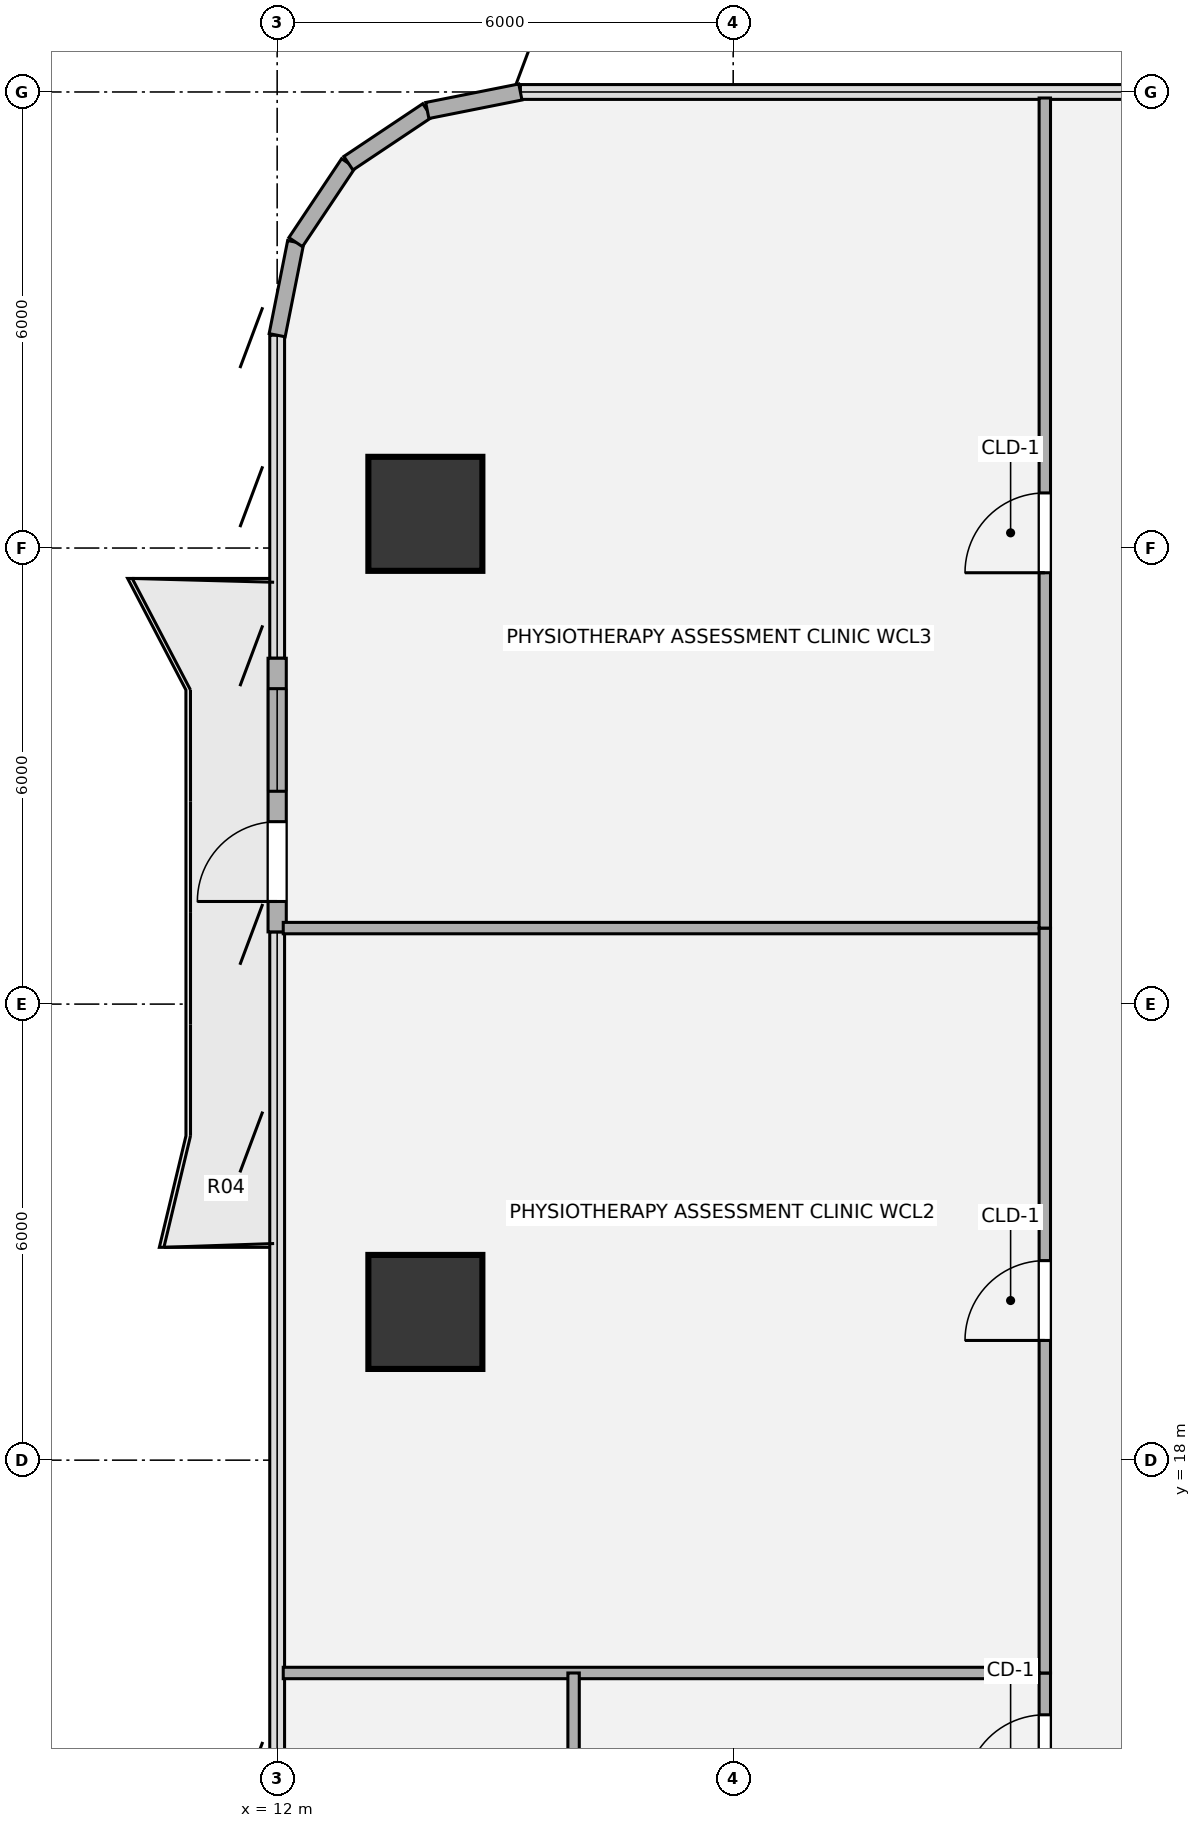
"""IFC4 building model, lengths in metres.
Left out: names, types, materials, properties, quantities, classifications, styles, units other than length and angle.
Written with IfcOpenShell. Run it as: python <this file> out.ifc"""

import sys

from ifc_helpers import new_model, si_unit, direction, frame, frame_2d, origin, origin_2d, place, context, subcontext, project, spatial, rectangle, hollow_circle, extrude, source, transform, mapped, element, fill, save


model = new_model("IFC4")
c1 = context("Model", 3, precision=1e-05, world=origin(), true_north=direction((0.0, 1.0)))
c2 = subcontext(c1, "Body", "Model", "MODEL_VIEW")
j1 = project(units=[si_unit("LENGTHUNIT", "METRE"), si_unit("PLANEANGLEUNIT", "RADIAN")], contexts=[c1])
p1 = place(None, origin())
s1 = spatial("IfcSite", under=j1, at=p1, CompositionType="ELEMENT")
p2 = place(p1, origin())
s2 = spatial("IfcBuilding", under=s1, at=p2, CompositionType="ELEMENT")
p3 = place(p2, frame((0.0, 0.0, 49.68)))
s3 = spatial("IfcBuildingStorey", under=s2, at=p3, CompositionType="ELEMENT", Elevation=49.68)
m1 = source(origin(), c2, "Body", "SweptSolid", [
    extrude(hollow_circle(Radius=0.75, WallThickness=0.05, at=origin_2d()), origin(), (0.0, 0.0, 1.0), 3.78),
])
for number, where, z_axis, x_axis in (
    (1, (13.95, 19.95, 0.0), (0.0, 0.0, 1.0), (1.0, 0.0, 0.0)),
    (2, (13.95, 30.45, 0.0), (0.0, 0.0, 1.0), (1.0, 0.0, 0.0)),
):
    element("IfcColumn", number, at=place(p3, frame(where, z_axis=z_axis, x_axis=x_axis)), inside=s3, PredefinedType="COLUMN", context=c2, shape_type="MappedRepresentation", body=[
        mapped(m1, transform((0.0, 0.0, 0.0), x_axis=(1.0, 0.0, 0.0), y_axis=(0.0, 1.0, 0.0), z_axis=(0.0, 0.0, 1.0), scale=1.0)),
    ])
p4 = place(p3, frame((12.0, 24.95, 0.0), z_axis=(0.0, 0.0, 1.0), x_axis=(0.0, 1.0, 0.0)))
e3 = element("IfcWall", 3, at=p4, inside=s3, PredefinedType="SOLIDWALL", context=c2, shape_type="SweptSolid", body=[
    extrude(rectangle(XDim=3.6, YDim=0.24, at=frame_2d((1.8, 0.0))), origin(), (0.0, 0.0, 1.0), 3.53),
])
p5 = place(p4, frame((0.4, 0.0, 0.0)))
e4 = element("IfcOpeningElement", 4, at=p5, cuts=e3, PredefinedType="OPENING", context=c2, shape_type="SweptSolid", body=[
    extrude(rectangle(XDim=1.05, YDim=2.15, at=origin_2d()), frame((0.525, 0.13, 1.075), z_axis=(0.0, -1.0, 0.0), x_axis=(1.0, 0.0, 0.0)), (0.0, 0.0, 1.0), 0.26),
])
p6 = place(p4, frame((1.85, 0.0, 0.85)))
e5 = element("IfcOpeningElement", 5, at=p6, cuts=e3, PredefinedType="OPENING", context=c2, shape_type="SweptSolid", body=[
    extrude(rectangle(XDim=1.35, YDim=1.35, at=origin_2d()), frame((0.675, 0.13, 0.675), z_axis=(0.0, -1.0, 0.0), x_axis=(1.0, 0.0, 0.0)), (0.0, 0.0, 1.0), 0.26),
])
for number, where, z_axis, x_axis in (
    (6, (12.0, 32.8, 0.0), (0.0, 0.0, 1.0), (0.195, 0.981, 0.0)),
    (7, (12.244, 34.025, 0.0), (0.0, 0.0, 1.0), (0.556, 0.831, 0.0)),
    (8, (12.937, 35.063, 0.0), (0.0, 0.0, 1.0), (0.831, 0.556, 0.0)),
    (9, (13.975, 35.756, 0.0), (0.0, 0.0, 1.0), (0.981, 0.195, 0.0)),
):
    element("IfcWall", number, at=place(p3, frame(where, z_axis=z_axis, x_axis=x_axis)), inside=s3, PredefinedType="SOLIDWALL", context=c2, shape_type="SweptSolid", body=[
        extrude(rectangle(XDim=1.249, YDim=0.215, at=frame_2d((0.624, 0.0))), origin(), (0.0, 0.0, 1.0), 3.53),
    ])
p7 = place(p3, frame((12.08, 15.2, 0.0), z_axis=(0.0, 0.0, 1.0), x_axis=(1.0, 0.0, 0.0)))
e10 = element("IfcWall", 10, at=p7, inside=s3, PredefinedType="PARTITIONING", context=c2, shape_type="SweptSolid", body=[
    extrude(rectangle(XDim=10.02, YDim=0.15, at=frame_2d((5.01, 0.0))), origin(), (0.0, 0.0, 1.0), 3.5),
])
p8 = place(p3, frame((12.08, 25.0, 0.0), z_axis=(0.0, 0.0, 1.0), x_axis=(1.0, 0.0, 0.0)))
e11 = element("IfcWall", 11, at=p8, inside=s3, PredefinedType="PARTITIONING", context=c2, shape_type="SweptSolid", body=[
    extrude(rectangle(XDim=10.02, YDim=0.15, at=frame_2d((5.01, 0.0))), origin(), (0.0, 0.0, 1.0), 2.982),
])
p9 = place(p3, frame((15.9, 10.64, 0.0), z_axis=(0.0, 0.0, 1.0), x_axis=(0.0, 1.0, 0.0)))
e12 = element("IfcWall", 12, at=p9, inside=s3, PredefinedType="PARTITIONING", context=c2, shape_type="SweptSolid", body=[
    extrude(rectangle(XDim=4.56, YDim=0.15, at=frame_2d((2.28, 0.0))), origin(), (0.0, 0.0, 1.0), 3.5),
])
p10 = place(p9, frame((1.9, 0.0, 0.0)))
e13 = element("IfcOpeningElement", 13, at=p10, cuts=e12, PredefinedType="OPENING", context=c2, shape_type="SweptSolid", body=[
    extrude(rectangle(XDim=0.86, YDim=2.1, at=origin_2d()), frame((0.43, 0.085, 1.05), z_axis=(0.0, -1.0, 0.0), x_axis=(1.0, 0.0, 0.0)), (0.0, 0.0, 1.0), 0.17),
])
p11 = place(p3, frame((22.1, 13.04, 0.0), z_axis=(0.0, 0.0, 1.0), x_axis=(0.0, 1.0, 0.0)))
e14 = element("IfcWall", 14, at=p11, inside=s3, PredefinedType="PARTITIONING", context=c2, shape_type="SweptSolid", body=[
    extrude(rectangle(XDim=2.16, YDim=0.15, at=frame_2d((1.08, 0.0))), origin(), (0.0, 0.0, 1.0), 3.5),
])
p12 = place(p11, frame((0.56, 0.0, 0.0)))
e15 = element("IfcOpeningElement", 15, at=p12, cuts=e14, PredefinedType="OPENING", context=c2, shape_type="SweptSolid", body=[
    extrude(rectangle(XDim=1.05, YDim=2.1, at=origin_2d()), frame((0.525, 0.085, 1.05), z_axis=(0.0, -1.0, 0.0), x_axis=(1.0, 0.0, 0.0)), (0.0, 0.0, 1.0), 0.17),
])
p13 = place(p3, frame((22.1, 15.2, 0.0), z_axis=(0.0, 0.0, 1.0), x_axis=(0.0, 1.0, 0.0)))
e16 = element("IfcWall", 16, at=p13, inside=s3, PredefinedType="PARTITIONING", context=c2, shape_type="SweptSolid", body=[
    extrude(rectangle(XDim=9.8, YDim=0.15, at=frame_2d((4.9, 0.0))), origin(), (0.0, 0.0, 1.0), 3.5),
])
p14 = place(p13, frame((4.375, 0.0, 0.0)))
e17 = element("IfcOpeningElement", 17, at=p14, cuts=e16, PredefinedType="OPENING", context=c2, shape_type="SweptSolid", body=[
    extrude(rectangle(XDim=1.05, YDim=2.1, at=origin_2d()), frame((0.525, 0.085, 1.05), z_axis=(0.0, -1.0, 0.0), x_axis=(1.0, 0.0, 0.0)), (0.0, 0.0, 1.0), 0.17),
])
p15 = place(p3, frame((22.1, 25.0, 0.0), z_axis=(0.0, 0.0, 1.0), x_axis=(0.0, 1.0, 0.0)))
e18 = element("IfcWall", 18, at=p15, inside=s3, PredefinedType="PARTITIONING", context=c2, shape_type="SweptSolid", body=[
    extrude(rectangle(XDim=10.921, YDim=0.15, at=frame_2d((5.46, 0.0))), origin(), (0.0, 0.0, 1.0), 3.5),
])
p16 = place(p15, frame((4.675, 0.0, 0.0)))
e19 = element("IfcOpeningElement", 19, at=p16, cuts=e18, PredefinedType="OPENING", context=c2, shape_type="SweptSolid", body=[
    extrude(rectangle(XDim=1.05, YDim=2.1, at=origin_2d()), frame((0.525, 0.085, 1.05), z_axis=(0.0, -1.0, 0.0), x_axis=(1.0, 0.0, 0.0)), (0.0, 0.0, 1.0), 0.17),
])
m2 = source(origin(), c2, "Body", "SweptSolid", [
    extrude(rectangle(XDim=1.05, YDim=2.15, at=origin_2d()), frame((0.525, 0.025, 1.075), z_axis=(0.0, -1.0, 0.0), x_axis=(1.0, 0.0, 0.0)), (0.0, 0.0, 1.0), 0.05),
])
p17 = place(p5, origin())
e20 = element("IfcDoor", 20, at=p17, inside=s3, OperationType="SINGLE_SWING_LEFT", PredefinedType="DOOR", context=c2, shape_type="MappedRepresentation", body=[
    mapped(m2, transform((0.0, 0.0, 0.0), x_axis=(1.0, 0.0, 0.0), y_axis=(0.0, 1.0, 0.0), z_axis=(0.0, 0.0, 1.0), scale=1.0)),
])
fill(e4, e20)
m3 = source(origin(), c2, "Body", "SweptSolid", [
    extrude(rectangle(XDim=1.35, YDim=1.35, at=origin_2d()), frame((0.675, 0.03, 0.675), z_axis=(0.0, -1.0, 0.0), x_axis=(1.0, 0.0, 0.0)), (0.0, 0.0, 1.0), 0.06),
])
p18 = place(p6, origin())
e21 = element("IfcWindow", 21, at=p18, inside=s3, PartitioningType="SINGLE_PANEL", PredefinedType="WINDOW", context=c2, shape_type="MappedRepresentation", body=[
    mapped(m3, transform((0.0, 0.0, 0.0), x_axis=(1.0, 0.0, 0.0), y_axis=(0.0, 1.0, 0.0), z_axis=(0.0, 0.0, 1.0), scale=1.0)),
])
fill(e5, e21)
m4 = source(origin(), c2, "Body", "SweptSolid", [
    extrude(rectangle(XDim=1.05, YDim=2.1, at=origin_2d()), frame((0.525, 0.025, 1.05), z_axis=(0.0, -1.0, 0.0), x_axis=(1.0, 0.0, 0.0)), (0.0, 0.0, 1.0), 0.05),
])
p19 = place(p12, origin())
e22 = element("IfcDoor", 22, at=p19, inside=s3, OperationType="SINGLE_SWING_LEFT", PredefinedType="DOOR", context=c2, shape_type="MappedRepresentation", body=[
    mapped(m4, transform((0.0, 0.0, 0.0), x_axis=(1.0, 0.0, 0.0), y_axis=(0.0, 1.0, 0.0), z_axis=(0.0, 0.0, 1.0), scale=1.0)),
])
fill(e15, e22)
m5 = source(origin(), c2, "Body", "SweptSolid", [
    extrude(rectangle(XDim=1.05, YDim=2.1, at=origin_2d()), frame((0.525, 0.025, 1.05), z_axis=(0.0, -1.0, 0.0), x_axis=(1.0, 0.0, 0.0)), (0.0, 0.0, 1.0), 0.05),
])
p20 = place(p14, origin())
e23 = element("IfcDoor", 23, at=p20, inside=s3, OperationType="SINGLE_SWING_LEFT", PredefinedType="DOOR", context=c2, shape_type="MappedRepresentation", body=[
    mapped(m5, transform((0.0, 0.0, 0.0), x_axis=(1.0, 0.0, 0.0), y_axis=(0.0, 1.0, 0.0), z_axis=(0.0, 0.0, 1.0), scale=1.0)),
])
fill(e17, e23)
p21 = place(p16, origin())
e24 = element("IfcDoor", 24, at=p21, inside=s3, OperationType="SINGLE_SWING_LEFT", PredefinedType="DOOR", context=c2, shape_type="MappedRepresentation", body=[
    mapped(m5, transform((0.0, 0.0, 0.0), x_axis=(1.0, 0.0, 0.0), y_axis=(0.0, 1.0, 0.0), z_axis=(0.0, 0.0, 1.0), scale=1.0)),
])
fill(e19, e24)
save(model, sys.argv[1])
